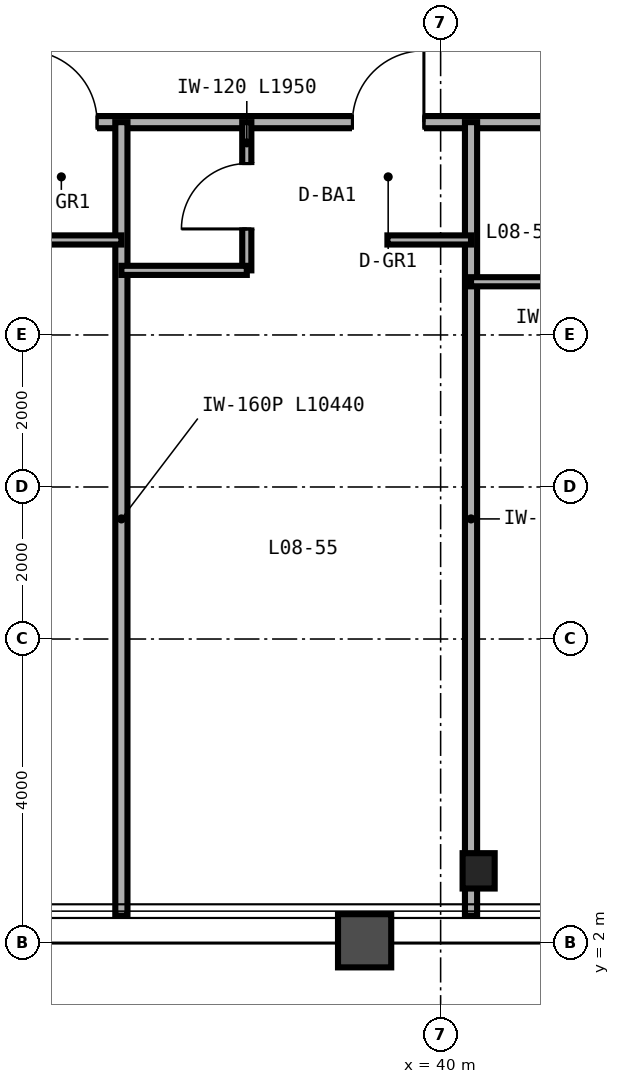
"""IFC4 building model, lengths in metres.
Left out: names, types, materials, properties, quantities, classifications, styles, units other than length and angle.
Written with IfcOpenShell. Run it as: python <this file> out.ifc"""

import sys

from ifc_helpers import new_model, si_unit, direction, frame, frame_2d, origin, origin_2d, place, context, subcontext, project, spatial, rectangle, i_section, extrude, source, transform, mapped, element, fill, save


model = new_model("IFC4")
c1 = context("Model", 3, precision=1e-05, world=origin(), true_north=direction((0.0, 1.0)))
c2 = subcontext(c1, "Body", "Model", "MODEL_VIEW")
j1 = project(units=[si_unit("LENGTHUNIT", "METRE"), si_unit("PLANEANGLEUNIT", "RADIAN")], contexts=[c1])
p1 = place(None, origin())
s1 = spatial("IfcSite", under=j1, at=p1, CompositionType="ELEMENT")
p2 = place(p1, origin())
s2 = spatial("IfcBuilding", under=s1, at=p2, CompositionType="ELEMENT")
p3 = place(p2, frame((0.0, 0.0, 38.4)))
s3 = spatial("IfcBuildingStorey", under=s2, at=p3, CompositionType="ELEMENT", Elevation=38.4)
m1 = source(origin(), c2, "Body", "SweptSolid", [
    extrude(i_section(OverallWidth=0.422, OverallDepth=0.465, WebThickness=0.045, FlangeThickness=0.073, FilletRadius=0.025, at=origin_2d()), origin(), (0.0, 0.0, 1.0), 3.35),
])
p4 = place(p3, frame((40.5, 2.95, 0.0), z_axis=(0.0, 0.0, 1.0), x_axis=(1.0, 0.0, 0.0)))
e1 = element("IfcColumn", 1, at=p4, inside=s3, PredefinedType="COLUMN", context=c2, shape_type="MappedRepresentation", body=[
    mapped(m1, transform((0.0, 0.0, 0.0), scale=1.0)),
])
p5 = place(p3, frame((14.0, 12.8, 0.0), z_axis=(0.0, 0.0, 1.0), x_axis=(1.0, 0.0, 0.0)))
e2 = element("IfcWall", 2, at=p5, inside=s3, PredefinedType="PARTITIONING", context=c2, shape_type="SweptSolid", body=[
    extrude(rectangle(XDim=36.0, YDim=0.16, at=frame_2d((18.0, 0.0))), origin(), (0.0, 0.0, 1.0), 2.571),
])
p6 = place(p5, frame((2.94, 0.0, 0.0)))
e3 = element("IfcOpeningElement", 3, at=p6, cuts=e2, PredefinedType="OPENING", context=c2, shape_type="SweptSolid", body=[
    extrude(rectangle(XDim=0.94, YDim=2.15, at=frame_2d((0.47, 1.075))), frame((0.0, 0.09, 0.0), z_axis=(0.0, -1.0, 0.0), x_axis=(1.0, 0.0, 0.0)), (0.0, 0.0, 1.0), 0.18),
])
p7 = place(p5, frame((7.14, 0.0, 0.0)))
e4 = element("IfcOpeningElement", 4, at=p7, cuts=e2, PredefinedType="OPENING", context=c2, shape_type="SweptSolid", body=[
    extrude(rectangle(XDim=0.94, YDim=2.15, at=frame_2d((0.47, 1.075))), frame((0.0, 0.09, 0.0), z_axis=(0.0, -1.0, 0.0), x_axis=(1.0, 0.0, 0.0)), (0.0, 0.0, 1.0), 0.18),
])
p8 = place(p5, frame((11.54, 0.0, 0.0)))
e5 = element("IfcOpeningElement", 5, at=p8, cuts=e2, PredefinedType="OPENING", context=c2, shape_type="SweptSolid", body=[
    extrude(rectangle(XDim=0.94, YDim=2.15, at=frame_2d((0.47, 1.075))), frame((0.0, 0.09, 0.0), z_axis=(0.0, -1.0, 0.0), x_axis=(1.0, 0.0, 0.0)), (0.0, 0.0, 1.0), 0.18),
])
p9 = place(p5, frame((15.94, 0.0, 0.0)))
e6 = element("IfcOpeningElement", 6, at=p9, cuts=e2, PredefinedType="OPENING", context=c2, shape_type="SweptSolid", body=[
    extrude(rectangle(XDim=0.94, YDim=2.15, at=frame_2d((0.47, 1.075))), frame((0.0, 0.09, 0.0), z_axis=(0.0, -1.0, 0.0), x_axis=(1.0, 0.0, 0.0)), (0.0, 0.0, 1.0), 0.18),
])
p10 = place(p5, frame((20.54, 0.0, 0.0)))
e7 = element("IfcOpeningElement", 7, at=p10, cuts=e2, PredefinedType="OPENING", context=c2, shape_type="SweptSolid", body=[
    extrude(rectangle(XDim=0.94, YDim=2.15, at=frame_2d((0.47, 1.075))), frame((0.0, 0.09, 0.0), z_axis=(0.0, -1.0, 0.0), x_axis=(1.0, 0.0, 0.0)), (0.0, 0.0, 1.0), 0.18),
])
p11 = place(p5, frame((24.84, 0.0, 0.0)))
e8 = element("IfcOpeningElement", 8, at=p11, cuts=e2, PredefinedType="OPENING", context=c2, shape_type="SweptSolid", body=[
    extrude(rectangle(XDim=0.94, YDim=2.15, at=frame_2d((0.47, 1.075))), frame((0.0, 0.09, 0.0), z_axis=(0.0, -1.0, 0.0), x_axis=(1.0, 0.0, 0.0)), (0.0, 0.0, 1.0), 0.18),
])
p12 = place(p5, frame((29.94, 0.0, 0.0)))
e9 = element("IfcOpeningElement", 9, at=p12, cuts=e2, PredefinedType="OPENING", context=c2, shape_type="SweptSolid", body=[
    extrude(rectangle(XDim=0.94, YDim=2.15, at=frame_2d((0.47, 1.075))), frame((0.0, 0.09, 0.0), z_axis=(0.0, -1.0, 0.0), x_axis=(1.0, 0.0, 0.0)), (0.0, 0.0, 1.0), 0.18),
])
p13 = place(p5, frame((34.74, 0.0, 0.0)))
e10 = element("IfcOpeningElement", 10, at=p13, cuts=e2, PredefinedType="OPENING", context=c2, shape_type="SweptSolid", body=[
    extrude(rectangle(XDim=0.94, YDim=2.15, at=frame_2d((0.47, 1.075))), frame((0.0, 0.09, 0.0), z_axis=(0.0, -1.0, 0.0), x_axis=(1.0, 0.0, 0.0)), (0.0, 0.0, 1.0), 0.18),
])
p14 = place(p3, frame((35.8, 2.36, 0.0), z_axis=(0.0, 0.0, 1.0), x_axis=(0.0, 1.0, 0.0)))
e11 = element("IfcWall", 11, at=p14, inside=s3, PredefinedType="PARTITIONING", context=c2, shape_type="SweptSolid", body=[
    extrude(rectangle(XDim=10.44, YDim=0.16, at=frame_2d((5.22, 0.0))), origin(), (0.0, 0.0, 1.0), 2.423),
])
p15 = place(p3, frame((34.7, 11.25, 0.0), z_axis=(0.0, 0.0, 1.0), x_axis=(1.0, 0.0, 0.0)))
e12 = element("IfcWall", 12, at=p15, inside=s3, PredefinedType="PARTITIONING", context=c2, shape_type="SweptSolid", body=[
    extrude(rectangle(XDim=1.1, YDim=0.12, at=frame_2d((0.55, 0.0))), origin(), (0.0, 0.0, 1.0), 3.35),
])
p16 = place(p3, frame((40.4, 2.36, 0.0), z_axis=(0.0, 0.0, 1.0), x_axis=(0.0, 1.0, 0.0)))
e13 = element("IfcWall", 13, at=p16, inside=s3, PredefinedType="PARTITIONING", context=c2, shape_type="SweptSolid", body=[
    extrude(rectangle(XDim=10.44, YDim=0.16, at=frame_2d((5.22, 0.0))), origin(), (0.0, 0.0, 1.0), 2.423),
])
p17 = place(p3, frame((37.45, 10.85, 0.0), z_axis=(0.0, 0.0, 1.0), x_axis=(0.0, 1.0, 0.0)))
e14 = element("IfcWall", 14, at=p17, inside=s3, PredefinedType="PARTITIONING", context=c2, shape_type="SweptSolid", body=[
    extrude(rectangle(XDim=1.95, YDim=0.12, at=frame_2d((0.975, 0.0))), origin(), (0.0, 0.0, 1.0), 3.35),
])
p18 = place(p17, frame((0.545, 0.0, 0.0)))
e15 = element("IfcOpeningElement", 15, at=p18, cuts=e14, PredefinedType="OPENING", context=c2, shape_type="SweptSolid", body=[
    extrude(rectangle(XDim=0.86, YDim=2.1, at=frame_2d((0.43, 1.05))), frame((0.0, 0.07, 0.0), z_axis=(0.0, -1.0, 0.0), x_axis=(1.0, 0.0, 0.0)), (0.0, 0.0, 1.0), 0.14),
])
p19 = place(p3, frame((35.8, 10.85, 0.0), z_axis=(0.0, 0.0, 1.0), x_axis=(1.0, 0.0, 0.0)))
e16 = element("IfcWall", 16, at=p19, inside=s3, PredefinedType="PARTITIONING", context=c2, shape_type="SweptSolid", body=[
    extrude(rectangle(XDim=1.65, YDim=0.12, at=frame_2d((0.825, 0.0))), origin(), (0.0, 0.0, 1.0), 3.35),
])
p20 = place(p3, frame((39.3, 11.25, 0.0), z_axis=(0.0, 0.0, 1.0), x_axis=(1.0, 0.0, 0.0)))
e17 = element("IfcWall", 17, at=p20, inside=s3, PredefinedType="PARTITIONING", context=c2, shape_type="SweptSolid", body=[
    extrude(rectangle(XDim=1.1, YDim=0.12, at=frame_2d((0.55, 0.0))), origin(), (0.0, 0.0, 1.0), 2.571),
])
p21 = place(p3, frame((40.4, 10.7, 0.0), z_axis=(0.0, 0.0, 1.0), x_axis=(1.0, 0.0, 0.0)))
e18 = element("IfcWall", 18, at=p21, inside=s3, PredefinedType="PARTITIONING", context=c2, shape_type="SweptSolid", body=[
    extrude(rectangle(XDim=2.05, YDim=0.12, at=frame_2d((1.025, 0.0))), origin(), (0.0, 0.0, 1.0), 2.571),
])
m2 = source(origin(), c2, "Body", "SweptSolid", [
    extrude(rectangle(XDim=0.86, YDim=2.1, at=frame_2d((0.43, 1.05))), frame((0.0, 0.025, 0.0), z_axis=(0.0, -1.0, 0.0), x_axis=(1.0, 0.0, 0.0)), (0.0, 0.0, 1.0), 0.05),
])
p22 = place(p18, origin())
e19 = element("IfcDoor", 19, at=p22, inside=s3, OperationType="SINGLE_SWING_LEFT", PredefinedType="DOOR", context=c2, shape_type="MappedRepresentation", body=[
    mapped(m2, transform((0.0, 0.0, 0.0), scale=1.0)),
])
fill(e15, e19)
m3 = source(origin(), c2, "Body", "SweptSolid", [
    extrude(rectangle(XDim=0.94, YDim=2.15, at=frame_2d((0.47, 1.075))), frame((0.0, 0.025, 0.0), z_axis=(0.0, -1.0, 0.0), x_axis=(1.0, 0.0, 0.0)), (0.0, 0.0, 1.0), 0.05),
])
p23 = place(p10, origin())
e20 = element("IfcDoor", 20, at=p23, inside=s3, OperationType="SINGLE_SWING_LEFT", PredefinedType="DOOR", context=c2, shape_type="MappedRepresentation", body=[
    mapped(m3, transform((0.0, 0.0, 0.0), scale=1.0)),
])
fill(e7, e20)
p24 = place(p11, origin())
e21 = element("IfcDoor", 21, at=p24, inside=s3, OperationType="SINGLE_SWING_RIGHT", PredefinedType="DOOR", context=c2, shape_type="MappedRepresentation", body=[
    mapped(m3, transform((0.0, 0.0, 0.0), scale=1.0)),
])
fill(e8, e21)
save(model, sys.argv[1])
